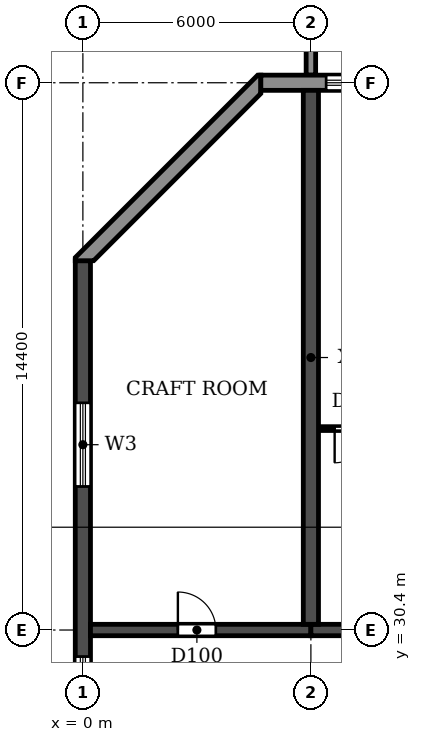
"""IFC4 building model, lengths in metres.
Left out: names, types, materials, properties, quantities, classifications, styles, units other than length and angle.
Written with IfcOpenShell. Run it as: python <this file> out.ifc"""

import sys

from ifc_helpers import new_model, si_unit, direction, frame, frame_2d, origin, place, context, subcontext, project, spatial, polyline, rectangle, outline, extrude, source, transform, mapped, element, fill, save


model = new_model("IFC4")
c1 = context("Model", 3, precision=1e-05, world=origin(), true_north=direction((0.0, 1.0)))
c2 = subcontext(c1, "Body", "Model", "MODEL_VIEW")
j1 = project(units=[si_unit("LENGTHUNIT", "METRE"), si_unit("PLANEANGLEUNIT", "RADIAN")], contexts=[c1])
p1 = place(None, origin())
s1 = spatial("IfcSite", under=j1, at=p1, CompositionType="ELEMENT")
p2 = place(p1, origin())
s2 = spatial("IfcBuilding", under=s1, at=p2, CompositionType="ELEMENT")
p3 = place(p2, frame((0.0, 0.0, 26.7)))
s3 = spatial("IfcBuildingStorey", under=s2, at=p3, CompositionType="ELEMENT", Elevation=26.7)
p4 = place(p3, frame((6.0, 30.55, 0.0), z_axis=(0.0, 0.0, 1.0), x_axis=(0.0, 1.0, 0.0)))
e1 = element("IfcWall", 1, at=p4, inside=s3, PredefinedType="SHEAR", context=c2, shape_type="SweptSolid", body=[
    extrude(rectangle(XDim=14.05, YDim=0.4, at=frame_2d((7.025, 0.0))), origin(), (0.0, 0.0, 1.0), 3.05),
])
p5 = place(p3, frame((0.0, 4.683, 0.0), z_axis=(0.0, 0.0, 1.0), x_axis=(0.0, 1.0, 0.0)))
e2 = element("IfcWall", 2, at=p5, inside=s3, PredefinedType="SHEAR", context=c2, shape_type="SweptSolid", body=[
    extrude(rectangle(XDim=35.434, YDim=0.4, at=frame_2d((17.717, 0.0))), origin(), (0.0, 0.0, 1.0), 3.05),
])
p6 = place(p5, frame((23.817, 0.0, 0.9)))
e3 = element("IfcOpeningElement", 3, at=p6, cuts=e2, PredefinedType="OPENING", context=c2, shape_type="SweptSolid", body=[
    extrude(rectangle(XDim=1.2, YDim=1.5, at=frame_2d((0.6, 0.75))), frame((0.0, 0.21, 0.0), z_axis=(0.0, -1.0, 0.0), x_axis=(1.0, 0.0, 0.0)), (0.0, 0.0, 1.0), 0.42),
])
p7 = place(p5, frame((8.017, 0.0, 0.9)))
e4 = element("IfcOpeningElement", 4, at=p7, cuts=e2, PredefinedType="OPENING", context=c2, shape_type="SweptSolid", body=[
    extrude(rectangle(XDim=1.2, YDim=1.5, at=frame_2d((0.6, 0.75))), frame((0.0, 0.21, 0.0), z_axis=(0.0, -1.0, 0.0), x_axis=(1.0, 0.0, 0.0)), (0.0, 0.0, 1.0), 0.42),
])
p8 = place(p5, frame((15.917, 0.0, 0.9)))
e5 = element("IfcOpeningElement", 5, at=p8, cuts=e2, PredefinedType="OPENING", context=c2, shape_type="SweptSolid", body=[
    extrude(rectangle(XDim=1.2, YDim=1.5, at=frame_2d((0.6, 0.75))), frame((0.0, 0.21, 0.0), z_axis=(0.0, -1.0, 0.0), x_axis=(1.0, 0.0, 0.0)), (0.0, 0.0, 1.0), 0.42),
])
p9 = place(p5, frame((29.493, 0.0, 0.6)))
e6 = element("IfcOpeningElement", 6, at=p9, cuts=e2, PredefinedType="OPENING", context=c2, shape_type="SweptSolid", body=[
    extrude(rectangle(XDim=2.2, YDim=1.8, at=frame_2d((1.1, 0.9))), frame((0.0, 0.21, 0.0), z_axis=(0.0, -1.0, 0.0), x_axis=(1.0, 0.0, 0.0)), (0.0, 0.0, 1.0), 0.42),
])
p10 = place(p5, frame((2.541, 0.0, 0.6)))
e7 = element("IfcOpeningElement", 7, at=p10, cuts=e2, PredefinedType="OPENING", context=c2, shape_type="SweptSolid", body=[
    extrude(rectangle(XDim=2.2, YDim=1.8, at=frame_2d((1.1, 0.9))), frame((0.0, 0.21, 0.0), z_axis=(0.0, -1.0, 0.0), x_axis=(1.0, 0.0, 0.0)), (0.0, 0.0, 1.0), 0.42),
])
p11 = place(p3, frame((0.2, 30.4, 0.0), z_axis=(0.0, 0.0, 1.0), x_axis=(1.0, 0.0, 0.0)))
e8 = element("IfcWall", 8, at=p11, inside=s3, PredefinedType="SHEAR", context=c2, shape_type="SweptSolid", body=[
    extrude(rectangle(XDim=5.8, YDim=0.3, at=frame_2d((2.9, 0.0))), origin(), (0.0, 0.0, 1.0), 2.45),
])
p12 = place(p11, frame((2.3, 0.0, 0.0)))
e9 = element("IfcOpeningElement", 9, at=p12, cuts=e8, PredefinedType="OPENING", context=c2, shape_type="SweptSolid", body=[
    extrude(rectangle(XDim=1.0, YDim=2.1, at=frame_2d((0.5, 1.05))), frame((0.0, 0.16, 0.0), z_axis=(0.0, -1.0, 0.0), x_axis=(1.0, 0.0, 0.0)), (0.0, 0.0, 1.0), 0.32),
])
p13 = place(p3, frame((6.0, 30.4, 0.0), z_axis=(0.0, 0.0, 1.0), x_axis=(1.0, 0.0, 0.0)))
e10 = element("IfcWall", 10, at=p13, inside=s3, PredefinedType="SHEAR", context=c2, shape_type="SweptSolid", body=[
    extrude(rectangle(XDim=6.0, YDim=0.3, at=frame_2d((3.0, 0.0))), origin(), (0.0, 0.0, 1.0), 2.45),
])
p14 = place(p13, frame((2.55, 0.0, 0.0)))
e11 = element("IfcOpeningElement", 11, at=p14, cuts=e10, PredefinedType="OPENING", context=c2, shape_type="SweptSolid", body=[
    extrude(rectangle(XDim=1.0, YDim=2.1, at=frame_2d((0.5, 1.05))), frame((0.0, 0.16, 0.0), z_axis=(0.0, -1.0, 0.0), x_axis=(1.0, 0.0, 0.0)), (0.0, 0.0, 1.0), 0.32),
])
p15 = place(p3, frame((97.317, 44.8, 0.0), z_axis=(0.0, 0.0, 1.0), x_axis=(-1.0, 0.0, 0.0)))
e12 = element("IfcWall", 12, at=p15, inside=s3, PredefinedType="STANDARD", context=c2, shape_type="SweptSolid", body=[
    extrude(rectangle(XDim=92.634, YDim=0.4, at=frame_2d((46.317, 0.0))), origin(), (0.0, 0.0, 1.0), 3.05),
])
p16 = place(p15, frame((88.717, 0.0, 0.9)))
e13 = element("IfcOpeningElement", 13, at=p16, cuts=e12, PredefinedType="OPENING", context=c2, shape_type="SweptSolid", body=[
    extrude(rectangle(XDim=2.2, YDim=1.5, at=frame_2d((1.1, 0.75))), frame((0.0, 0.21, 0.0), z_axis=(0.0, -1.0, 0.0), x_axis=(1.0, 0.0, 0.0)), (0.0, 0.0, 1.0), 0.42),
])
p17 = place(p15, frame((85.917, 0.0, 0.0)))
e14 = element("IfcOpeningElement", 14, at=p17, cuts=e12, PredefinedType="OPENING", context=c2, shape_type="SweptSolid", body=[
    extrude(rectangle(XDim=1.8, YDim=2.4, at=frame_2d((0.9, 1.2))), frame((0.0, 0.21, 0.0), z_axis=(0.0, -1.0, 0.0), x_axis=(1.0, 0.0, 0.0)), (0.0, 0.0, 1.0), 0.42),
])
p18 = place(p15, frame((82.717, 0.0, 0.9)))
e15 = element("IfcOpeningElement", 15, at=p18, cuts=e12, PredefinedType="OPENING", context=c2, shape_type="SweptSolid", body=[
    extrude(rectangle(XDim=2.2, YDim=1.5, at=frame_2d((1.1, 0.75))), frame((0.0, 0.21, 0.0), z_axis=(0.0, -1.0, 0.0), x_axis=(1.0, 0.0, 0.0)), (0.0, 0.0, 1.0), 0.42),
])
p19 = place(p15, frame((79.717, 0.0, 0.9)))
e16 = element("IfcOpeningElement", 16, at=p19, cuts=e12, PredefinedType="OPENING", context=c2, shape_type="SweptSolid", body=[
    extrude(rectangle(XDim=2.2, YDim=1.5, at=frame_2d((1.1, 0.75))), frame((0.0, 0.21, 0.0), z_axis=(0.0, -1.0, 0.0), x_axis=(1.0, 0.0, 0.0)), (0.0, 0.0, 1.0), 0.42),
])
p20 = place(p15, frame((76.917, 0.0, 0.0)))
e17 = element("IfcOpeningElement", 17, at=p20, cuts=e12, PredefinedType="OPENING", context=c2, shape_type="SweptSolid", body=[
    extrude(rectangle(XDim=1.8, YDim=2.4, at=frame_2d((0.9, 1.2))), frame((0.0, 0.21, 0.0), z_axis=(0.0, -1.0, 0.0), x_axis=(1.0, 0.0, 0.0)), (0.0, 0.0, 1.0), 0.42),
])
p21 = place(p15, frame((73.717, 0.0, 0.9)))
e18 = element("IfcOpeningElement", 18, at=p21, cuts=e12, PredefinedType="OPENING", context=c2, shape_type="SweptSolid", body=[
    extrude(rectangle(XDim=2.2, YDim=1.5, at=frame_2d((1.1, 0.75))), frame((0.0, 0.21, 0.0), z_axis=(0.0, -1.0, 0.0), x_axis=(1.0, 0.0, 0.0)), (0.0, 0.0, 1.0), 0.42),
])
p22 = place(p15, frame((70.717, 0.0, 0.9)))
e19 = element("IfcOpeningElement", 19, at=p22, cuts=e12, PredefinedType="OPENING", context=c2, shape_type="SweptSolid", body=[
    extrude(rectangle(XDim=2.2, YDim=1.5, at=frame_2d((1.1, 0.75))), frame((0.0, 0.21, 0.0), z_axis=(0.0, -1.0, 0.0), x_axis=(1.0, 0.0, 0.0)), (0.0, 0.0, 1.0), 0.42),
])
p23 = place(p15, frame((67.717, 0.0, 0.9)))
e20 = element("IfcOpeningElement", 20, at=p23, cuts=e12, PredefinedType="OPENING", context=c2, shape_type="SweptSolid", body=[
    extrude(rectangle(XDim=2.2, YDim=1.5, at=frame_2d((1.1, 0.75))), frame((0.0, 0.21, 0.0), z_axis=(0.0, -1.0, 0.0), x_axis=(1.0, 0.0, 0.0)), (0.0, 0.0, 1.0), 0.42),
])
p24 = place(p15, frame((64.917, 0.0, 0.0)))
e21 = element("IfcOpeningElement", 21, at=p24, cuts=e12, PredefinedType="OPENING", context=c2, shape_type="SweptSolid", body=[
    extrude(rectangle(XDim=1.8, YDim=2.4, at=frame_2d((0.9, 1.2))), frame((0.0, 0.21, 0.0), z_axis=(0.0, -1.0, 0.0), x_axis=(1.0, 0.0, 0.0)), (0.0, 0.0, 1.0), 0.42),
])
p25 = place(p15, frame((61.717, 0.0, 0.9)))
e22 = element("IfcOpeningElement", 22, at=p25, cuts=e12, PredefinedType="OPENING", context=c2, shape_type="SweptSolid", body=[
    extrude(rectangle(XDim=2.2, YDim=1.5, at=frame_2d((1.1, 0.75))), frame((0.0, 0.21, 0.0), z_axis=(0.0, -1.0, 0.0), x_axis=(1.0, 0.0, 0.0)), (0.0, 0.0, 1.0), 0.42),
])
p26 = place(p15, frame((58.717, 0.0, 0.9)))
e23 = element("IfcOpeningElement", 23, at=p26, cuts=e12, PredefinedType="OPENING", context=c2, shape_type="SweptSolid", body=[
    extrude(rectangle(XDim=2.2, YDim=1.5, at=frame_2d((1.1, 0.75))), frame((0.0, 0.21, 0.0), z_axis=(0.0, -1.0, 0.0), x_axis=(1.0, 0.0, 0.0)), (0.0, 0.0, 1.0), 0.42),
])
p27 = place(p15, frame((55.917, 0.0, 0.0)))
e24 = element("IfcOpeningElement", 24, at=p27, cuts=e12, PredefinedType="OPENING", context=c2, shape_type="SweptSolid", body=[
    extrude(rectangle(XDim=1.8, YDim=2.4, at=frame_2d((0.9, 1.2))), frame((0.0, 0.21, 0.0), z_axis=(0.0, -1.0, 0.0), x_axis=(1.0, 0.0, 0.0)), (0.0, 0.0, 1.0), 0.42),
])
p28 = place(p15, frame((52.917, 0.0, 0.0)))
e25 = element("IfcOpeningElement", 25, at=p28, cuts=e12, PredefinedType="OPENING", context=c2, shape_type="SweptSolid", body=[
    extrude(rectangle(XDim=1.8, YDim=2.4, at=frame_2d((0.9, 1.2))), frame((0.0, 0.21, 0.0), z_axis=(0.0, -1.0, 0.0), x_axis=(1.0, 0.0, 0.0)), (0.0, 0.0, 1.0), 0.42),
])
p29 = place(p15, frame((49.717, 0.0, 0.9)))
e26 = element("IfcOpeningElement", 26, at=p29, cuts=e12, PredefinedType="OPENING", context=c2, shape_type="SweptSolid", body=[
    extrude(rectangle(XDim=2.2, YDim=1.5, at=frame_2d((1.1, 0.75))), frame((0.0, 0.21, 0.0), z_axis=(0.0, -1.0, 0.0), x_axis=(1.0, 0.0, 0.0)), (0.0, 0.0, 1.0), 0.42),
])
p30 = place(p15, frame((46.917, 0.0, 0.0)))
e27 = element("IfcOpeningElement", 27, at=p30, cuts=e12, PredefinedType="OPENING", context=c2, shape_type="SweptSolid", body=[
    extrude(rectangle(XDim=1.8, YDim=2.4, at=frame_2d((0.9, 1.2))), frame((0.0, 0.21, 0.0), z_axis=(0.0, -1.0, 0.0), x_axis=(1.0, 0.0, 0.0)), (0.0, 0.0, 1.0), 0.42),
])
p31 = place(p15, frame((43.717, 0.0, 0.9)))
e28 = element("IfcOpeningElement", 28, at=p31, cuts=e12, PredefinedType="OPENING", context=c2, shape_type="SweptSolid", body=[
    extrude(rectangle(XDim=2.2, YDim=1.5, at=frame_2d((1.1, 0.75))), frame((0.0, 0.21, 0.0), z_axis=(0.0, -1.0, 0.0), x_axis=(1.0, 0.0, 0.0)), (0.0, 0.0, 1.0), 0.42),
])
p32 = place(p15, frame((40.717, 0.0, 0.9)))
e29 = element("IfcOpeningElement", 29, at=p32, cuts=e12, PredefinedType="OPENING", context=c2, shape_type="SweptSolid", body=[
    extrude(rectangle(XDim=2.2, YDim=1.5, at=frame_2d((1.1, 0.75))), frame((0.0, 0.21, 0.0), z_axis=(0.0, -1.0, 0.0), x_axis=(1.0, 0.0, 0.0)), (0.0, 0.0, 1.0), 0.42),
])
p33 = place(p15, frame((37.917, 0.0, 0.0)))
e30 = element("IfcOpeningElement", 30, at=p33, cuts=e12, PredefinedType="OPENING", context=c2, shape_type="SweptSolid", body=[
    extrude(rectangle(XDim=1.8, YDim=2.4, at=frame_2d((0.9, 1.2))), frame((0.0, 0.21, 0.0), z_axis=(0.0, -1.0, 0.0), x_axis=(1.0, 0.0, 0.0)), (0.0, 0.0, 1.0), 0.42),
])
p34 = place(p15, frame((34.917, 0.0, 0.0)))
e31 = element("IfcOpeningElement", 31, at=p34, cuts=e12, PredefinedType="OPENING", context=c2, shape_type="SweptSolid", body=[
    extrude(rectangle(XDim=1.8, YDim=2.4, at=frame_2d((0.9, 1.2))), frame((0.0, 0.21, 0.0), z_axis=(0.0, -1.0, 0.0), x_axis=(1.0, 0.0, 0.0)), (0.0, 0.0, 1.0), 0.42),
])
p35 = place(p15, frame((31.717, 0.0, 0.9)))
e32 = element("IfcOpeningElement", 32, at=p35, cuts=e12, PredefinedType="OPENING", context=c2, shape_type="SweptSolid", body=[
    extrude(rectangle(XDim=2.2, YDim=1.5, at=frame_2d((1.1, 0.75))), frame((0.0, 0.21, 0.0), z_axis=(0.0, -1.0, 0.0), x_axis=(1.0, 0.0, 0.0)), (0.0, 0.0, 1.0), 0.42),
])
p36 = place(p15, frame((28.717, 0.0, 0.9)))
e33 = element("IfcOpeningElement", 33, at=p36, cuts=e12, PredefinedType="OPENING", context=c2, shape_type="SweptSolid", body=[
    extrude(rectangle(XDim=2.2, YDim=1.5, at=frame_2d((1.1, 0.75))), frame((0.0, 0.21, 0.0), z_axis=(0.0, -1.0, 0.0), x_axis=(1.0, 0.0, 0.0)), (0.0, 0.0, 1.0), 0.42),
])
p37 = place(p15, frame((25.717, 0.0, 0.9)))
e34 = element("IfcOpeningElement", 34, at=p37, cuts=e12, PredefinedType="OPENING", context=c2, shape_type="SweptSolid", body=[
    extrude(rectangle(XDim=2.2, YDim=1.5, at=frame_2d((1.1, 0.75))), frame((0.0, 0.21, 0.0), z_axis=(0.0, -1.0, 0.0), x_axis=(1.0, 0.0, 0.0)), (0.0, 0.0, 1.0), 0.42),
])
p38 = place(p15, frame((22.717, 0.0, 0.9)))
e35 = element("IfcOpeningElement", 35, at=p38, cuts=e12, PredefinedType="OPENING", context=c2, shape_type="SweptSolid", body=[
    extrude(rectangle(XDim=2.2, YDim=1.5, at=frame_2d((1.1, 0.75))), frame((0.0, 0.21, 0.0), z_axis=(0.0, -1.0, 0.0), x_axis=(1.0, 0.0, 0.0)), (0.0, 0.0, 1.0), 0.42),
])
p39 = place(p15, frame((19.917, 0.0, 0.0)))
e36 = element("IfcOpeningElement", 36, at=p39, cuts=e12, PredefinedType="OPENING", context=c2, shape_type="SweptSolid", body=[
    extrude(rectangle(XDim=1.8, YDim=2.4, at=frame_2d((0.9, 1.2))), frame((0.0, 0.21, 0.0), z_axis=(0.0, -1.0, 0.0), x_axis=(1.0, 0.0, 0.0)), (0.0, 0.0, 1.0), 0.42),
])
p40 = place(p15, frame((16.717, 0.0, 0.9)))
e37 = element("IfcOpeningElement", 37, at=p40, cuts=e12, PredefinedType="OPENING", context=c2, shape_type="SweptSolid", body=[
    extrude(rectangle(XDim=2.2, YDim=1.5, at=frame_2d((1.1, 0.75))), frame((0.0, 0.21, 0.0), z_axis=(0.0, -1.0, 0.0), x_axis=(1.0, 0.0, 0.0)), (0.0, 0.0, 1.0), 0.42),
])
p41 = place(p15, frame((13.717, 0.0, 0.9)))
e38 = element("IfcOpeningElement", 38, at=p41, cuts=e12, PredefinedType="OPENING", context=c2, shape_type="SweptSolid", body=[
    extrude(rectangle(XDim=2.2, YDim=1.5, at=frame_2d((1.1, 0.75))), frame((0.0, 0.21, 0.0), z_axis=(0.0, -1.0, 0.0), x_axis=(1.0, 0.0, 0.0)), (0.0, 0.0, 1.0), 0.42),
])
p42 = place(p15, frame((10.717, 0.0, 0.9)))
e39 = element("IfcOpeningElement", 39, at=p42, cuts=e12, PredefinedType="OPENING", context=c2, shape_type="SweptSolid", body=[
    extrude(rectangle(XDim=2.2, YDim=1.5, at=frame_2d((1.1, 0.75))), frame((0.0, 0.21, 0.0), z_axis=(0.0, -1.0, 0.0), x_axis=(1.0, 0.0, 0.0)), (0.0, 0.0, 1.0), 0.42),
])
p43 = place(p15, frame((7.917, 0.0, 0.0)))
e40 = element("IfcOpeningElement", 40, at=p43, cuts=e12, PredefinedType="OPENING", context=c2, shape_type="SweptSolid", body=[
    extrude(rectangle(XDim=1.8, YDim=2.4, at=frame_2d((0.9, 1.2))), frame((0.0, 0.21, 0.0), z_axis=(0.0, -1.0, 0.0), x_axis=(1.0, 0.0, 0.0)), (0.0, 0.0, 1.0), 0.42),
])
p44 = place(p15, frame((4.917, 0.0, 0.0)))
e41 = element("IfcOpeningElement", 41, at=p44, cuts=e12, PredefinedType="OPENING", context=c2, shape_type="SweptSolid", body=[
    extrude(rectangle(XDim=1.8, YDim=2.4, at=frame_2d((0.9, 1.2))), frame((0.0, 0.21, 0.0), z_axis=(0.0, -1.0, 0.0), x_axis=(1.0, 0.0, 0.0)), (0.0, 0.0, 1.0), 0.42),
])
p45 = place(p15, frame((1.717, 0.0, 0.9)))
e42 = element("IfcOpeningElement", 42, at=p45, cuts=e12, PredefinedType="OPENING", context=c2, shape_type="SweptSolid", body=[
    extrude(rectangle(XDim=2.2, YDim=1.5, at=frame_2d((1.1, 0.75))), frame((0.0, 0.21, 0.0), z_axis=(0.0, -1.0, 0.0), x_axis=(1.0, 0.0, 0.0)), (0.0, 0.0, 1.0), 0.42),
])
p46 = place(p3, origin())
e43 = element("IfcWall", 43, at=p46, inside=s3, PredefinedType="STANDARD", context=c2, shape_type="SweptSolid", body=[
    extrude(outline(polyline([(4.683, 45.0), (4.6, 45.0), (-0.2, 40.2), (-0.2, 40.117), (0.283, 40.117), (4.683, 44.517), (4.683, 45.0)])), origin(), (0.0, 0.0, 1.0), 3.05),
])
m1 = source(origin(), c2, "Body", "SweptSolid", [
    extrude(outline(polyline([(0.0, 0.0), (0.25, 0.0), (0.25, 3.1), (0.0, 3.1), (0.0, 0.0)])), origin(), (0.0, 0.0, 1.0), 3.1),
])
p47 = place(p3, frame((5.875, 45.0, 0.0)))
e44 = element("IfcWall", 44, at=p47, inside=s3, PredefinedType="STANDARD", context=c2, shape_type="MappedRepresentation", body=[
    mapped(m1, transform((0.0, 0.0, 0.0))),
])
p48 = place(p3, frame((6.21, 35.7, 0.0), z_axis=(0.0, 0.0, 1.0), x_axis=(1.0, 0.0, 0.0)))
e45 = element("IfcWall", 45, at=p48, inside=s3, PredefinedType="PARTITIONING", context=c2, shape_type="SweptSolid", body=[
    extrude(rectangle(XDim=1.99, YDim=0.1, at=frame_2d((0.995, 0.0))), origin(), (0.0, 0.0, 1.0), 3.05),
])
p49 = place(p48, frame((0.415, 0.0, 0.0)))
e46 = element("IfcOpeningElement", 46, at=p49, cuts=e45, PredefinedType="OPENING", context=c2, shape_type="SweptSolid", body=[
    extrude(rectangle(XDim=0.9, YDim=2.1, at=frame_2d((0.45, 1.05))), frame((0.0, 0.06, 0.0), z_axis=(0.0, -1.0, 0.0), x_axis=(1.0, 0.0, 0.0)), (0.0, 0.0, 1.0), 0.12),
])
p50 = place(p16, origin())
e47 = element("IfcWindow", 47, at=p50, inside=s3, PartitioningType="DOUBLE_PANEL_HORIZONTAL", PredefinedType="WINDOW", context=c2, shape_type="SweptSolid", body=[
    extrude(rectangle(XDim=2.2, YDim=1.5, at=frame_2d((1.1, 0.75))), frame((0.0, 0.03, 0.0), z_axis=(0.0, -1.0, 0.0), x_axis=(1.0, 0.0, 0.0)), (0.0, 0.0, 1.0), 0.06),
])
fill(e13, e47)
p51 = place(p6, origin())
e48 = element("IfcWindow", 48, at=p51, inside=s3, PartitioningType="SINGLE_PANEL", PredefinedType="WINDOW", context=c2, shape_type="SweptSolid", body=[
    extrude(rectangle(XDim=1.2, YDim=1.5, at=frame_2d((0.6, 0.75))), frame((0.0, 0.03, 0.0), z_axis=(0.0, -1.0, 0.0), x_axis=(1.0, 0.0, 0.0)), (0.0, 0.0, 1.0), 0.06),
])
fill(e3, e48)
p52 = place(p9, origin())
e49 = element("IfcWindow", 49, at=p52, inside=s3, PartitioningType="DOUBLE_PANEL_HORIZONTAL", PredefinedType="WINDOW", context=c2, shape_type="SweptSolid", body=[
    extrude(rectangle(XDim=2.2, YDim=1.8, at=frame_2d((1.1, 0.9))), frame((0.0, 0.03, 0.0), z_axis=(0.0, -1.0, 0.0), x_axis=(1.0, 0.0, 0.0)), (0.0, 0.0, 1.0), 0.06),
])
fill(e6, e49)
p53 = place(p12, origin())
e50 = element("IfcDoor", 50, at=p53, inside=s3, OperationType="SINGLE_SWING_LEFT", PredefinedType="DOOR", context=c2, shape_type="SweptSolid", body=[
    extrude(rectangle(XDim=1.0, YDim=2.1, at=frame_2d((0.5, 1.05))), frame((0.0, 0.025, 0.0), z_axis=(0.0, -1.0, 0.0), x_axis=(1.0, 0.0, 0.0)), (0.0, 0.0, 1.0), 0.05),
])
fill(e9, e50)
p54 = place(p49, frame((0.9, 0.0, 0.0), z_axis=(0.0, 0.0, 1.0), x_axis=(-1.0, 0.0, 0.0)))
e51 = element("IfcDoor", 51, at=p54, inside=s3, OperationType="SINGLE_SWING_RIGHT", PredefinedType="DOOR", context=c2, shape_type="SweptSolid", body=[
    extrude(rectangle(XDim=0.9, YDim=2.1, at=frame_2d((0.45, 1.05))), frame((0.0, 0.025, 0.0), z_axis=(0.0, -1.0, 0.0), x_axis=(1.0, 0.0, 0.0)), (0.0, 0.0, 1.0), 0.05),
])
fill(e46, e51)
save(model, sys.argv[1])
